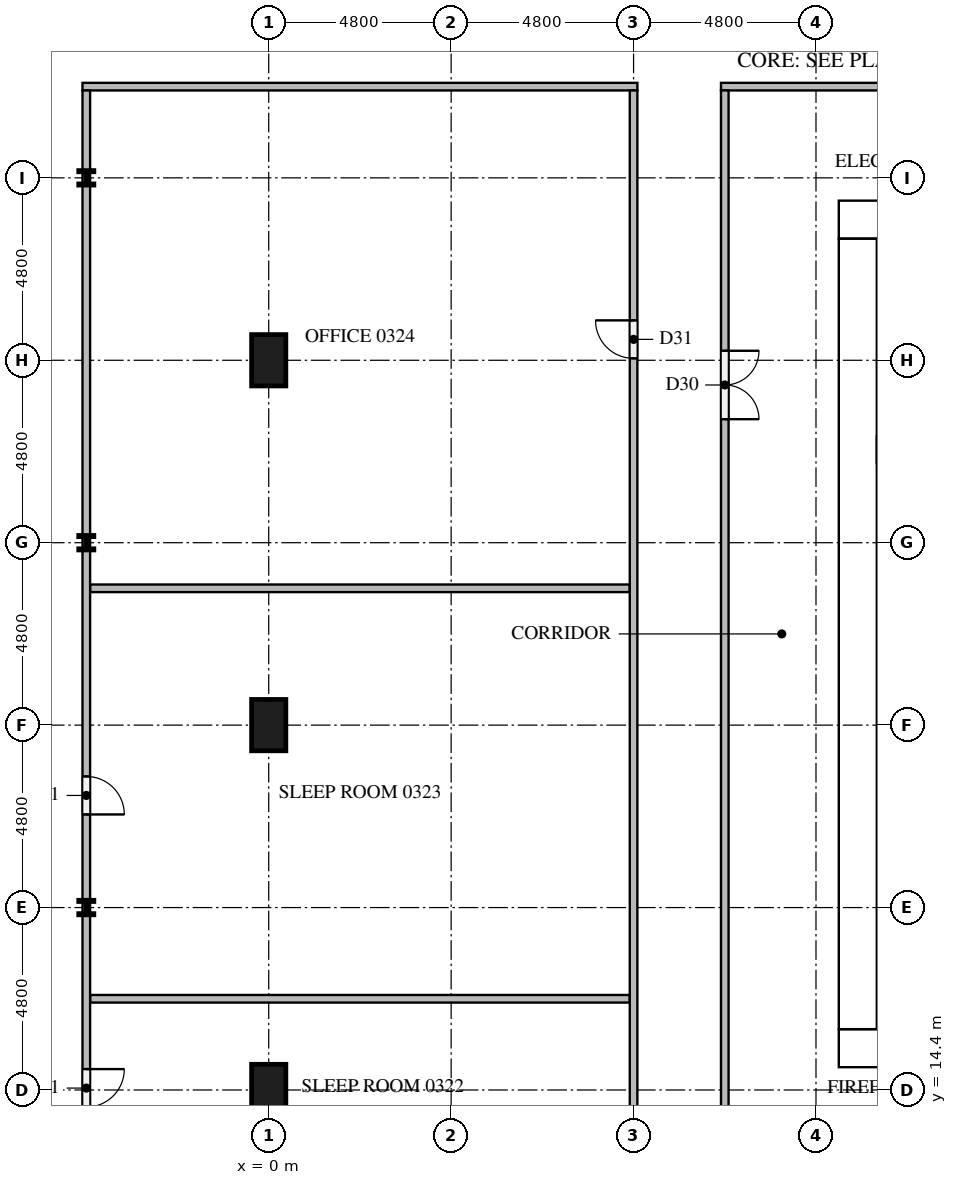
"""IFC4 building model, lengths in metres.
Left out: names, types, materials, properties, quantities, classifications, styles, units other than length and angle.
Written with IfcOpenShell. Run it as: python <this file> out.ifc"""

import sys

from ifc_helpers import new_model, si_unit, direction, frame, frame_2d, origin, origin_2d, place, context, subcontext, project, spatial, rectangle, i_section, extrude, element, fill, save


model = new_model("IFC4")
c1 = context("Model", 3, precision=1e-05, world=origin(), true_north=direction((0.0, 1.0)))
c2 = subcontext(c1, "Body", "Model", "MODEL_VIEW")
j1 = project(units=[si_unit("LENGTHUNIT", "METRE"), si_unit("PLANEANGLEUNIT", "RADIAN")], contexts=[c1])
p1 = place(None, origin())
s1 = spatial("IfcSite", under=j1, at=p1, CompositionType="ELEMENT")
p2 = place(p1, origin())
s2 = spatial("IfcBuilding", under=s1, at=p2, CompositionType="ELEMENT")
p3 = place(p2, frame((0.0, 0.0, 15.0)))
s3 = spatial("IfcBuildingStorey", under=s2, at=p3, CompositionType="ELEMENT", Elevation=15.0)
p4 = place(p3, frame((15.0, 15.5, 0.0), z_axis=(0.0, 0.0, 1.0), x_axis=(1.0, 0.0, 0.0)))
e1 = element("IfcWall", 1, at=p4, inside=s3, PredefinedType="SHEAR", context=c2, shape_type="SweptSolid", body=[
    extrude(rectangle(XDim=32.4, YDim=1.0, at=frame_2d((16.2, 0.0))), origin(), (0.0, 0.0, 1.0), 4.2),
])
p5 = place(p4, frame((15.3, 0.0, 0.0)))
e2 = element("IfcOpeningElement", 2, at=p5, cuts=e1, PredefinedType="OPENING", context=c2, shape_type="SweptSolid", body=[
    extrude(rectangle(XDim=1.8, YDim=2.1, at=frame_2d((0.9, 1.05))), frame((0.0, 0.51, 0.0), z_axis=(0.0, -1.0, 0.0), x_axis=(1.0, 0.0, 0.0)), (0.0, 0.0, 1.0), 1.02),
])
p6 = place(p3, frame((15.0, 37.3, 0.0), z_axis=(0.0, 0.0, 1.0), x_axis=(1.0, 0.0, 0.0)))
e3 = element("IfcWall", 3, at=p6, inside=s3, PredefinedType="SHEAR", context=c2, shape_type="SweptSolid", body=[
    extrude(rectangle(XDim=32.4, YDim=1.0, at=frame_2d((16.2, 0.0))), origin(), (0.0, 0.0, 1.0), 4.2),
])
p7 = place(p6, frame((15.3, 0.0, 0.0)))
e4 = element("IfcOpeningElement", 4, at=p7, cuts=e3, PredefinedType="OPENING", context=c2, shape_type="SweptSolid", body=[
    extrude(rectangle(XDim=1.8, YDim=2.1, at=frame_2d((0.9, 1.05))), frame((0.0, 0.51, 0.0), z_axis=(0.0, -1.0, 0.0), x_axis=(1.0, 0.0, 0.0)), (0.0, 0.0, 1.0), 1.02),
])
p8 = place(p6, frame((1.766, 0.0, 0.0)))
e5 = element("IfcOpeningElement", 5, at=p8, cuts=e3, PredefinedType="OPENING", context=c2, shape_type="SweptSolid", body=[
    extrude(rectangle(XDim=1.0, YDim=2.1, at=frame_2d((0.5, 1.05))), frame((0.0, 0.51, 0.0), z_axis=(0.0, -1.0, 0.0), x_axis=(1.0, 0.0, 0.0)), (0.0, 0.0, 1.0), 1.02),
])
p9 = place(p6, frame((5.241, 0.0, 0.0)))
e6 = element("IfcOpeningElement", 6, at=p9, cuts=e3, PredefinedType="OPENING", context=c2, shape_type="SweptSolid", body=[
    extrude(rectangle(XDim=1.0, YDim=2.1, at=frame_2d((0.5, 1.05))), frame((0.0, 0.51, 0.0), z_axis=(0.0, -1.0, 0.0), x_axis=(1.0, 0.0, 0.0)), (0.0, 0.0, 1.0), 1.02),
])
p10 = place(p3, frame((15.5, 16.0, 0.0), z_axis=(0.0, 0.0, 1.0), x_axis=(0.0, 1.0, 0.0)))
e7 = element("IfcWall", 7, at=p10, inside=s3, PredefinedType="SHEAR", context=c2, shape_type="SweptSolid", body=[
    extrude(rectangle(XDim=20.8, YDim=1.0, at=frame_2d((10.4, 0.0))), origin(), (0.0, 0.0, 1.0), 4.2),
])
p11 = place(p10, frame((4.76, 0.0, 0.0)))
e8 = element("IfcOpeningElement", 8, at=p11, cuts=e7, PredefinedType="OPENING", context=c2, shape_type="SweptSolid", body=[
    extrude(rectangle(XDim=1.2, YDim=2.1, at=frame_2d((0.6, 1.05))), frame((0.0, 0.51, 0.0), z_axis=(0.0, -1.0, 0.0), x_axis=(1.0, 0.0, 0.0)), (0.0, 0.0, 1.0), 1.02),
])
for number, where, z_axis, x_axis in (
    (9, (0.0, 33.6, 0.0), (0.0, 0.0, 1.0), (0.0, 1.0, 0.0)),
    (10, (0.0, 24.0, 0.0), (0.0, 0.0, 1.0), (0.0, 1.0, 0.0)),
    (11, (0.0, 14.4, 0.0), (0.0, 0.0, 1.0), (0.0, 1.0, 0.0)),
):
    element("IfcColumn", number, at=place(p3, frame(where, z_axis=z_axis, x_axis=x_axis)), inside=s3, PredefinedType="COLUMN", context=c2, shape_type="SweptSolid", body=[
        extrude(rectangle(XDim=1.35, YDim=0.9, at=origin_2d()), origin(), (0.0, 0.0, 1.0), 4.2),
    ])
for number, where, z_axis, x_axis in (
    (12, (-4.8, 19.2, 0.0), (0.0, 0.0, 1.0), (1.0, 0.0, 0.0)),
    (13, (-4.8, 28.8, 0.0), (0.0, 0.0, 1.0), (1.0, 0.0, 0.0)),
    (14, (-4.8, 38.4, 0.0), (0.0, 0.0, 1.0), (1.0, 0.0, 0.0)),
):
    element("IfcColumn", number, at=place(p3, frame(where, z_axis=z_axis, x_axis=x_axis)), inside=s3, PredefinedType="COLUMN", context=c2, shape_type="SweptSolid", body=[
        extrude(i_section(OverallWidth=0.396, OverallDepth=0.381, WebThickness=0.019, FlangeThickness=0.03, at=origin_2d()), origin(), (0.0, 0.0, 1.0), 4.2),
    ])
for number, where, z_axis, x_axis in (
    (15, (-4.7, 16.8, 0.0), (0.0, 0.0, 1.0), (1.0, 0.0, 0.0)),
    (16, (-4.7, 27.6, 0.0), (0.0, 0.0, 1.0), (1.0, 0.0, 0.0)),
):
    element("IfcWall", number, at=place(p3, frame(where, z_axis=z_axis, x_axis=x_axis)), inside=s3, PredefinedType="PARTITIONING", context=c2, shape_type="SweptSolid", body=[
        extrude(rectangle(XDim=14.2, YDim=0.2, at=frame_2d((7.1, 0.0))), origin(), (0.0, 0.0, 1.0), 4.2),
    ])
p12 = place(p3, frame((-4.9, 40.8, 0.0), z_axis=(0.0, 0.0, 1.0), x_axis=(1.0, 0.0, 0.0)))
e17 = element("IfcWall", 17, at=p12, inside=s3, PredefinedType="PARTITIONING", context=c2, shape_type="SweptSolid", body=[
    extrude(rectangle(XDim=14.6, YDim=0.2, at=frame_2d((7.3, 0.0))), origin(), (0.0, 0.0, 1.0), 4.2),
])
p13 = place(p3, frame((50.5, 40.8, 0.0), z_axis=(0.0, 0.0, 1.0), x_axis=(-1.0, 0.0, 0.0)))
e18 = element("IfcWall", 18, at=p13, inside=s3, PredefinedType="PARTITIONING", context=c2, shape_type="SweptSolid", body=[
    extrude(rectangle(XDim=38.6, YDim=0.2, at=frame_2d((19.3, 0.0))), origin(), (0.0, 0.0, 1.0), 4.2),
])
p14 = place(p13, frame((18.45, 0.0, 0.0)))
e19 = element("IfcOpeningElement", 19, at=p14, cuts=e18, PredefinedType="OPENING", context=c2, shape_type="SweptSolid", body=[
    extrude(rectangle(XDim=1.8, YDim=2.1, at=frame_2d((0.9, 1.05))), frame((0.0, 0.11, 0.0), z_axis=(0.0, -1.0, 0.0), x_axis=(1.0, 0.0, 0.0)), (0.0, 0.0, 1.0), 0.22),
])
p15 = place(p13, frame((16.25, 0.0, 0.0)))
e20 = element("IfcOpeningElement", 20, at=p15, cuts=e18, PredefinedType="OPENING", context=c2, shape_type="SweptSolid", body=[
    extrude(rectangle(XDim=1.8, YDim=2.1, at=frame_2d((0.9, 1.05))), frame((0.0, 0.11, 0.0), z_axis=(0.0, -1.0, 0.0), x_axis=(1.0, 0.0, 0.0)), (0.0, 0.0, 1.0), 0.22),
])
p16 = place(p3, frame((-4.8, 40.7, 0.0), z_axis=(0.0, 0.0, 1.0), x_axis=(0.0, -1.0, 0.0)))
e21 = element("IfcWall", 21, at=p16, inside=s3, PredefinedType="PARTITIONING", context=c2, shape_type="SweptSolid", body=[
    extrude(rectangle(XDim=28.6, YDim=0.2, at=frame_2d((14.3, 0.0))), origin(), (0.0, 0.0, 1.0), 4.2),
])
p17 = place(p16, frame((25.75, 0.0, 0.0)))
e22 = element("IfcOpeningElement", 22, at=p17, cuts=e21, PredefinedType="OPENING", context=c2, shape_type="SweptSolid", body=[
    extrude(rectangle(XDim=1.0, YDim=2.1, at=frame_2d((0.5, 1.05))), frame((0.0, 0.11, 0.0), z_axis=(0.0, -1.0, 0.0), x_axis=(1.0, 0.0, 0.0)), (0.0, 0.0, 1.0), 0.22),
])
p18 = place(p16, frame((18.05, 0.0, 0.0)))
e23 = element("IfcOpeningElement", 23, at=p18, cuts=e21, PredefinedType="OPENING", context=c2, shape_type="SweptSolid", body=[
    extrude(rectangle(XDim=1.0, YDim=2.1, at=frame_2d((0.5, 1.05))), frame((0.0, 0.11, 0.0), z_axis=(0.0, -1.0, 0.0), x_axis=(1.0, 0.0, 0.0)), (0.0, 0.0, 1.0), 0.22),
])
p19 = place(p3, frame((9.6, 12.1, 0.0), z_axis=(0.0, 0.0, 1.0), x_axis=(0.0, 1.0, 0.0)))
e24 = element("IfcWall", 24, at=p19, inside=s3, PredefinedType="PARTITIONING", context=c2, shape_type="SweptSolid", body=[
    extrude(rectangle(XDim=28.6, YDim=0.2, at=frame_2d((14.3, 0.0))), origin(), (0.0, 0.0, 1.0), 4.2),
])
p20 = place(p19, frame((21.55, 0.0, 0.0)))
e25 = element("IfcOpeningElement", 25, at=p20, cuts=e24, PredefinedType="OPENING", context=c2, shape_type="SweptSolid", body=[
    extrude(rectangle(XDim=1.0, YDim=2.1, at=frame_2d((0.5, 1.05))), frame((0.0, 0.11, 0.0), z_axis=(0.0, -1.0, 0.0), x_axis=(1.0, 0.0, 0.0)), (0.0, 0.0, 1.0), 0.22),
])
p21 = place(p3, frame((12.0, 40.7, 0.0), z_axis=(0.0, 0.0, 1.0), x_axis=(0.0, -1.0, 0.0)))
e26 = element("IfcWall", 26, at=p21, inside=s3, PredefinedType="PARTITIONING", context=c2, shape_type="SweptSolid", body=[
    extrude(rectangle(XDim=28.6, YDim=0.2, at=frame_2d((14.3, 0.0))), origin(), (0.0, 0.0, 1.0), 4.2),
])
p22 = place(p21, frame((6.85, 0.0, 0.0)))
e27 = element("IfcOpeningElement", 27, at=p22, cuts=e26, PredefinedType="OPENING", context=c2, shape_type="SweptSolid", body=[
    extrude(rectangle(XDim=1.8, YDim=2.1, at=frame_2d((0.9, 1.05))), frame((0.0, 0.11, 0.0), z_axis=(0.0, -1.0, 0.0), x_axis=(1.0, 0.0, 0.0)), (0.0, 0.0, 1.0), 0.22),
])
p23 = place(p11, frame((1.2, 0.0, 0.0), z_axis=(0.0, 0.0, 1.0), x_axis=(-1.0, 0.0, 0.0)))
e28 = element("IfcDoor", 28, at=p23, inside=s3, OperationType="SINGLE_SWING_RIGHT", PredefinedType="DOOR", context=c2, shape_type="SweptSolid", body=[
    extrude(rectangle(XDim=1.2, YDim=2.1, at=frame_2d((0.6, 1.05))), frame((0.0, 0.025, 0.0), z_axis=(0.0, -1.0, 0.0), x_axis=(1.0, 0.0, 0.0)), (0.0, 0.0, 1.0), 0.05),
])
fill(e8, e28)
p24 = place(p17, origin())
e29 = element("IfcDoor", 29, at=p24, inside=s3, OperationType="SINGLE_SWING_LEFT", PredefinedType="DOOR", context=c2, shape_type="SweptSolid", body=[
    extrude(rectangle(XDim=1.0, YDim=2.1, at=frame_2d((0.5, 1.05))), frame((0.0, 0.025, 0.0), z_axis=(0.0, -1.0, 0.0), x_axis=(1.0, 0.0, 0.0)), (0.0, 0.0, 1.0), 0.05),
])
fill(e22, e29)
p25 = place(p18, origin())
e30 = element("IfcDoor", 30, at=p25, inside=s3, OperationType="SINGLE_SWING_RIGHT", PredefinedType="DOOR", context=c2, shape_type="SweptSolid", body=[
    extrude(rectangle(XDim=1.0, YDim=2.1, at=frame_2d((0.5, 1.05))), frame((0.0, 0.025, 0.0), z_axis=(0.0, -1.0, 0.0), x_axis=(1.0, 0.0, 0.0)), (0.0, 0.0, 1.0), 0.05),
])
fill(e23, e30)
p26 = place(p20, origin())
e31 = element("IfcDoor", 31, at=p26, inside=s3, OperationType="SINGLE_SWING_RIGHT", PredefinedType="DOOR", context=c2, shape_type="SweptSolid", body=[
    extrude(rectangle(XDim=1.0, YDim=2.1, at=frame_2d((0.5, 1.05))), frame((0.0, 0.025, 0.0), z_axis=(0.0, -1.0, 0.0), x_axis=(1.0, 0.0, 0.0)), (0.0, 0.0, 1.0), 0.05),
])
fill(e25, e31)
p27 = place(p22, origin())
e32 = element("IfcDoor", 32, at=p27, inside=s3, OperationType="DOUBLE_DOOR_SINGLE_SWING", PredefinedType="DOOR", context=c2, shape_type="SweptSolid", body=[
    extrude(rectangle(XDim=1.8, YDim=2.1, at=frame_2d((0.9, 1.05))), frame((0.0, 0.025, 0.0), z_axis=(0.0, -1.0, 0.0), x_axis=(1.0, 0.0, 0.0)), (0.0, 0.0, 1.0), 0.05),
])
fill(e27, e32)
save(model, sys.argv[1])
